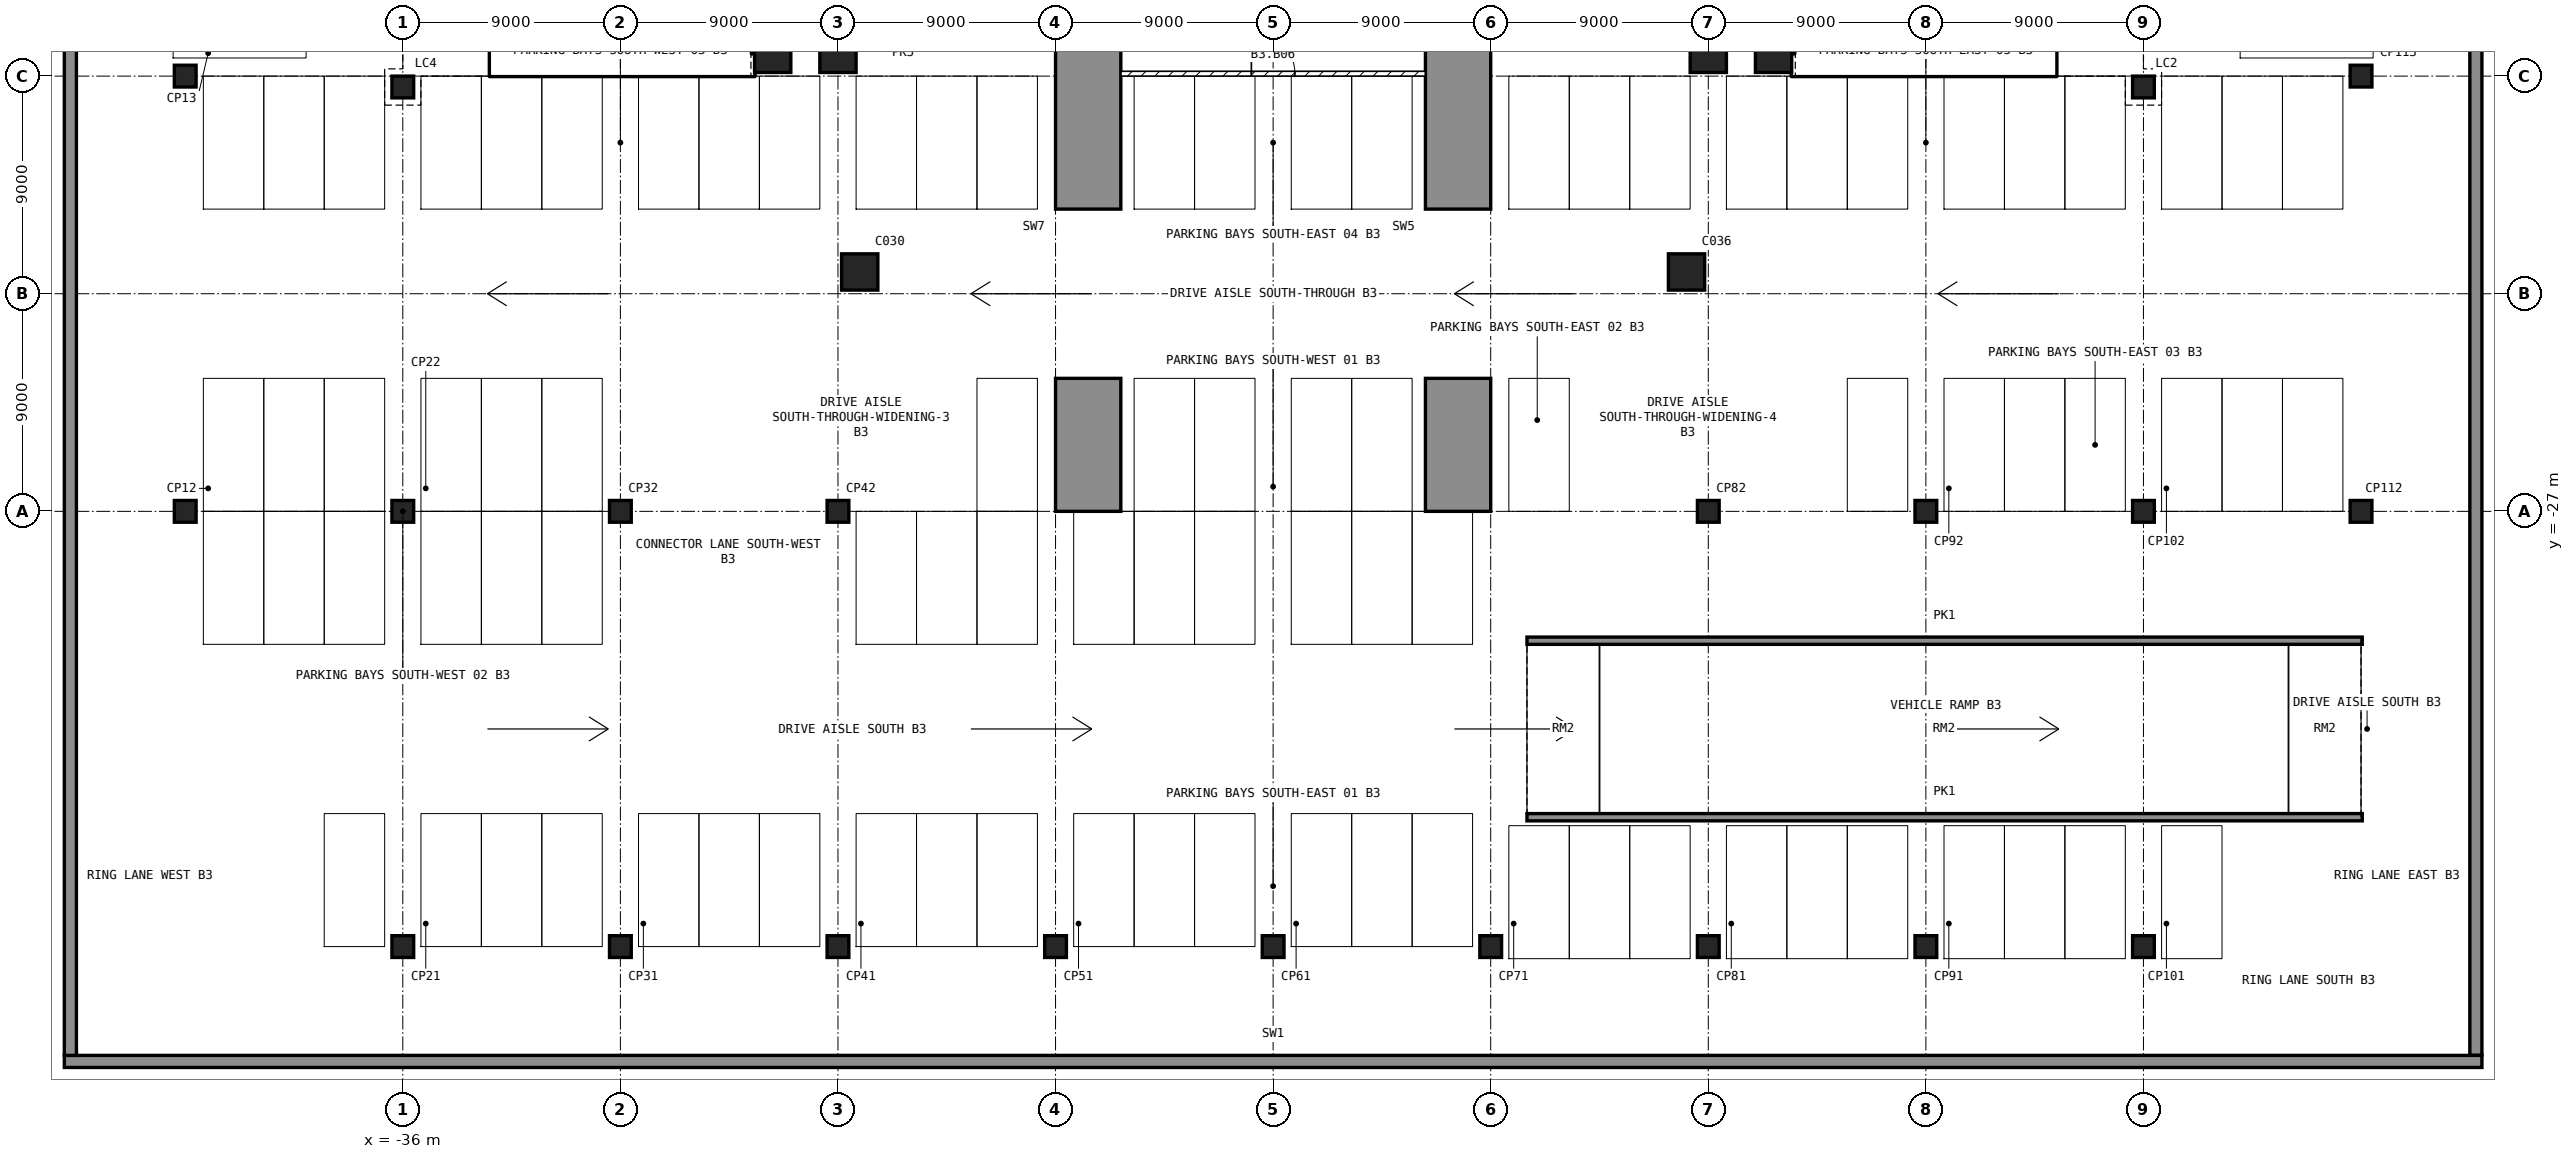
"""IFC4 building model, lengths in metres.
Left out: names, types, materials, properties, quantities, classifications, styles, units other than length and angle.
Written with IfcOpenShell. Run it as: python <this file> out.ifc"""

import sys

from ifc_helpers import new_model, si_unit, direction, frame, frame_2d, origin, origin_2d, place, context, subcontext, project, spatial, polyline, rectangle, outline, extrude, element, fill, save


model = new_model("IFC4")
c1 = context("Model", 3, precision=1e-05, world=origin(), true_north=direction((0.0, 1.0)))
c2 = subcontext(c1, "Body", "Model", "MODEL_VIEW")
j1 = project(units=[si_unit("LENGTHUNIT", "METRE"), si_unit("PLANEANGLEUNIT", "RADIAN")], contexts=[c1])
p1 = place(None, origin())
s1 = spatial("IfcSite", under=j1, at=p1, CompositionType="ELEMENT")
p2 = place(p1, origin())
s2 = spatial("IfcBuilding", under=s1, at=p2, CompositionType="ELEMENT")
p3 = place(p2, frame((0.0, 0.0, -12.9)))
s3 = spatial("IfcBuildingStorey", under=s2, at=p3, CompositionType="ELEMENT", Elevation=-12.9)
p4 = place(p3, frame((-50.0, -49.75, -0.3), z_axis=(0.0, 0.0, 1.0), x_axis=(1.0, 0.0, 0.0)))
e1 = element("IfcWall", 1, at=p4, inside=s3, PredefinedType="SOLIDWALL", context=c2, shape_type="SweptSolid", body=[
    extrude(rectangle(XDim=100.0, YDim=0.5, at=frame_2d((50.0, 0.0))), origin(), (0.0, 0.0, 1.0), 4.2),
])
for number, where, z_axis, x_axis in (
    (2, (49.75, -49.5, -0.3), (0.0, 0.0, 1.0), (0.0, 1.0, 0.0)),
    (3, (-49.75, -49.5, -0.3), (0.0, 0.0, 1.0), (0.0, 1.0, 0.0)),
):
    element("IfcWall", number, at=place(p3, frame(where, z_axis=z_axis, x_axis=x_axis)), inside=s3, PredefinedType="SOLIDWALL", context=c2, shape_type="SweptSolid", body=[
        extrude(rectangle(XDim=99.0, YDim=0.5, at=frame_2d((49.5, 0.0))), origin(), (0.0, 0.0, 1.0), 4.2),
    ])
for number, where, z_axis, x_axis in (
    (4, (-20.7, -8.1, -0.3), (0.0, 0.0, 1.0), (1.0, 0.0, 0.0)),
    (5, (-18.0, -8.1, -0.3), (0.0, 0.0, 1.0), (1.0, 0.0, 0.0)),
    (6, (18.0, -8.1, -0.3), (0.0, 0.0, 1.0), (1.0, 0.0, 0.0)),
    (7, (20.7, -8.1, -0.3), (0.0, 0.0, 1.0), (1.0, 0.0, 0.0)),
    (8, (-17.1, -17.1, -0.3), (0.0, 0.0, 1.0), (1.0, 0.0, 0.0)),
    (9, (17.1, -17.1, -0.3), (0.0, 0.0, 1.0), (1.0, 0.0, 0.0)),
):
    element("IfcColumn", number, at=place(p3, frame(where, z_axis=z_axis, x_axis=x_axis)), inside=s3, PredefinedType="COLUMN", context=c2, shape_type="SweptSolid", body=[
        extrude(rectangle(XDim=1.5, YDim=1.5, at=origin_2d()), origin(), (0.0, 0.0, 1.0), 4.2),
    ])
for number, where, z_axis, x_axis in (
    (10, (-45.0, -27.0, -0.3), (0.0, 0.0, 1.0), (1.0, 0.0, 0.0)),
    (11, (-45.0, -9.0, -0.3), (0.0, 0.0, 1.0), (1.0, 0.0, 0.0)),
    (12, (-36.0, -45.0, -0.3), (0.0, 0.0, 1.0), (1.0, 0.0, 0.0)),
    (13, (-36.0, -27.0, -0.3), (0.0, 0.0, 1.0), (1.0, 0.0, 0.0)),
    (14, (-27.0, -45.0, -0.3), (0.0, 0.0, 1.0), (1.0, 0.0, 0.0)),
    (15, (-27.0, -27.0, -0.3), (0.0, 0.0, 1.0), (1.0, 0.0, 0.0)),
    (16, (-18.0, -45.0, -0.3), (0.0, 0.0, 1.0), (1.0, 0.0, 0.0)),
    (17, (-18.0, -27.0, -0.3), (0.0, 0.0, 1.0), (1.0, 0.0, 0.0)),
    (18, (-9.0, -45.0, -0.3), (0.0, 0.0, 1.0), (1.0, 0.0, 0.0)),
    (19, (0.0, -45.0, -0.3), (0.0, 0.0, 1.0), (1.0, 0.0, 0.0)),
    (20, (9.0, -45.0, -0.3), (0.0, 0.0, 1.0), (1.0, 0.0, 0.0)),
    (21, (18.0, -45.0, -0.3), (0.0, 0.0, 1.0), (1.0, 0.0, 0.0)),
    (22, (18.0, -27.0, -0.3), (0.0, 0.0, 1.0), (1.0, 0.0, 0.0)),
    (23, (27.0, -45.0, -0.3), (0.0, 0.0, 1.0), (1.0, 0.0, 0.0)),
    (24, (27.0, -27.0, -0.3), (0.0, 0.0, 1.0), (1.0, 0.0, 0.0)),
    (25, (36.0, -45.0, -0.3), (0.0, 0.0, 1.0), (1.0, 0.0, 0.0)),
    (26, (36.0, -27.0, -0.3), (0.0, 0.0, 1.0), (1.0, 0.0, 0.0)),
    (27, (45.0, -27.0, -0.3), (0.0, 0.0, 1.0), (1.0, 0.0, 0.0)),
    (28, (45.0, -9.0, -0.3), (0.0, 0.0, 1.0), (1.0, 0.0, 0.0)),
    (29, (36.0, -9.45, -0.3), (0.0, 0.0, 1.0), (1.0, 0.0, 0.0)),
    (30, (-36.0, -9.45, -0.3), (0.0, 0.0, 1.0), (1.0, 0.0, 0.0)),
):
    element("IfcColumn", number, at=place(p3, frame(where, z_axis=z_axis, x_axis=x_axis)), inside=s3, PredefinedType="COLUMN", context=c2, shape_type="SweptSolid", body=[
        extrude(rectangle(XDim=0.9, YDim=0.9, at=origin_2d()), origin(), (0.0, 0.0, 1.0), 4.2),
    ])
for number, where, z_axis, x_axis in (
    (31, (6.3, -27.0, -0.3), (1.0, 0.0, 0.0), (0.0, 1.0, 0.0)),
    (32, (-9.0, -27.0, -0.3), (1.0, 0.0, 0.0), (0.0, 1.0, 0.0)),
):
    element("IfcWall", number, at=place(p3, frame(where, z_axis=z_axis, x_axis=x_axis)), inside=s3, PredefinedType="SOLIDWALL", context=c2, shape_type="SweptSolid", body=[
        extrude(outline(polyline([(0.0, 0.0), (5.5, 0.0), (5.5, 3.3), (12.5, 3.3), (12.5, 0.0), (23.5, 0.0), (23.5, 4.2), (0.0, 4.2), (0.0, 0.0)])), origin(), (0.0, 0.0, 1.0), 2.7),
    ])
p5 = place(p3, frame((21.45, -8.55, 0.0), z_axis=(0.0, 0.0, 1.0), x_axis=(1.0, 0.0, 0.0)))
e33 = element("IfcWall", 33, at=p5, inside=s3, PredefinedType="SHEAR", context=c2, shape_type="SweptSolid", body=[
    extrude(rectangle(XDim=10.95, YDim=0.9, at=frame_2d((5.475, 0.0))), origin(), (0.0, 0.0, 1.0), 3.9),
])
p6 = place(p3, frame((31.95, -8.1, 0.0), z_axis=(0.0, 0.0, 1.0), x_axis=(0.0, 1.0, 0.0)))
e34 = element("IfcWall", 34, at=p6, inside=s3, PredefinedType="SHEAR", context=c2, shape_type="SweptSolid", body=[
    extrude(rectangle(XDim=1.8, YDim=0.9, at=frame_2d((0.9, 0.0))), origin(), (0.0, 0.0, 1.0), 3.9),
])
p7 = place(p3, frame((21.825, -8.1, 0.0), z_axis=(0.0, 0.0, 1.0), x_axis=(0.0, 1.0, 0.0)))
e35 = element("IfcWall", 35, at=p7, inside=s3, PredefinedType="SHEAR", context=c2, shape_type="SweptSolid", body=[
    extrude(rectangle(XDim=6.9, YDim=0.45, at=frame_2d((3.45, 0.0))), origin(), (0.0, 0.0, 1.0), 3.9),
])
p8 = place(p3, frame((28.25, -8.1, 0.0), z_axis=(0.0, 0.0, 1.0), x_axis=(0.0, 1.0, 0.0)))
e36 = element("IfcWall", 36, at=p8, inside=s3, PredefinedType="SOLIDWALL", context=c2, shape_type="SweptSolid", body=[
    extrude(rectangle(XDim=2.85, YDim=0.2, at=frame_2d((1.425, 0.0))), origin(), (0.0, 0.0, 1.0), 3.9),
])
p9 = place(p3, frame((-32.4, -8.55, 0.0), z_axis=(0.0, 0.0, 1.0), x_axis=(1.0, 0.0, 0.0)))
e37 = element("IfcWall", 37, at=p9, inside=s3, PredefinedType="SHEAR", context=c2, shape_type="SweptSolid", body=[
    extrude(rectangle(XDim=10.95, YDim=0.9, at=frame_2d((5.475, 0.0))), origin(), (0.0, 0.0, 1.0), 3.9),
])
p10 = place(p3, frame((-31.95, -8.1, 0.0), z_axis=(0.0, 0.0, 1.0), x_axis=(0.0, 1.0, 0.0)))
e38 = element("IfcWall", 38, at=p10, inside=s3, PredefinedType="SHEAR", context=c2, shape_type="SweptSolid", body=[
    extrude(rectangle(XDim=1.8, YDim=0.9, at=frame_2d((0.9, 0.0))), origin(), (0.0, 0.0, 1.0), 3.9),
])
p11 = place(p3, frame((-21.825, -8.1, 0.0), z_axis=(0.0, 0.0, 1.0), x_axis=(0.0, 1.0, 0.0)))
e39 = element("IfcWall", 39, at=p11, inside=s3, PredefinedType="SHEAR", context=c2, shape_type="SweptSolid", body=[
    extrude(rectangle(XDim=6.9, YDim=0.45, at=frame_2d((3.45, 0.0))), origin(), (0.0, 0.0, 1.0), 3.9),
])
p12 = place(p3, frame((-28.25, -8.1, 0.0), z_axis=(0.0, 0.0, 1.0), x_axis=(0.0, 1.0, 0.0)))
e40 = element("IfcWall", 40, at=p12, inside=s3, PredefinedType="SOLIDWALL", context=c2, shape_type="SweptSolid", body=[
    extrude(rectangle(XDim=2.85, YDim=0.2, at=frame_2d((1.425, 0.0))), origin(), (0.0, 0.0, 1.0), 3.9),
])
for number, where, z_axis, x_axis in (
    (41, (10.5, -39.65, 0.0), (0.0, 0.0, 1.0), (1.0, 0.0, 0.0)),
    (42, (10.5, -32.35, 0.0), (0.0, 0.0, 1.0), (1.0, 0.0, 0.0)),
):
    element("IfcWall", number, at=place(p3, frame(where, z_axis=z_axis, x_axis=x_axis)), inside=s3, PredefinedType="SOLIDWALL", context=c2, shape_type="SweptSolid", body=[
        extrude(rectangle(XDim=34.55, YDim=0.3, at=frame_2d((17.275, 0.0))), origin(), (0.0, 0.0, 1.0), 4.2),
    ])
p13 = place(p3, frame((-6.3, -8.9, 0.0), z_axis=(0.0, 0.0, 1.0), x_axis=(1.0, 0.0, 0.0)))
e43 = element("IfcWall", 43, at=p13, inside=s3, PredefinedType="PARTITIONING", context=c2, shape_type="SweptSolid", body=[
    extrude(rectangle(XDim=12.6, YDim=0.2, at=frame_2d((6.3, 0.0))), origin(), (0.0, 0.0, 1.0), 3.9),
])
p14 = place(p13, frame((5.4, 0.0, 0.0)))
e44 = element("IfcOpeningElement", 44, at=p14, cuts=e43, PredefinedType="OPENING", context=c2, shape_type="SweptSolid", body=[
    extrude(rectangle(XDim=1.8, YDim=2.1, at=frame_2d((0.9, 1.05))), frame((0.0, 0.11, 0.0), z_axis=(0.0, -1.0, 0.0), x_axis=(1.0, 0.0, 0.0)), (0.0, 0.0, 1.0), 0.22),
])
p15 = place(p14, origin())
e45 = element("IfcDoor", 45, at=p15, inside=s3, OperationType="SINGLE_SWING_LEFT", PredefinedType="DOOR", context=c2, shape_type="SweptSolid", body=[
    extrude(rectangle(XDim=1.8, YDim=2.1, at=frame_2d((0.9, 1.05))), frame((0.0, 0.025, 0.0), z_axis=(0.0, -1.0, 0.0), x_axis=(1.0, 0.0, 0.0)), (0.0, 0.0, 1.0), 0.05),
])
fill(e44, e45)
save(model, sys.argv[1])
